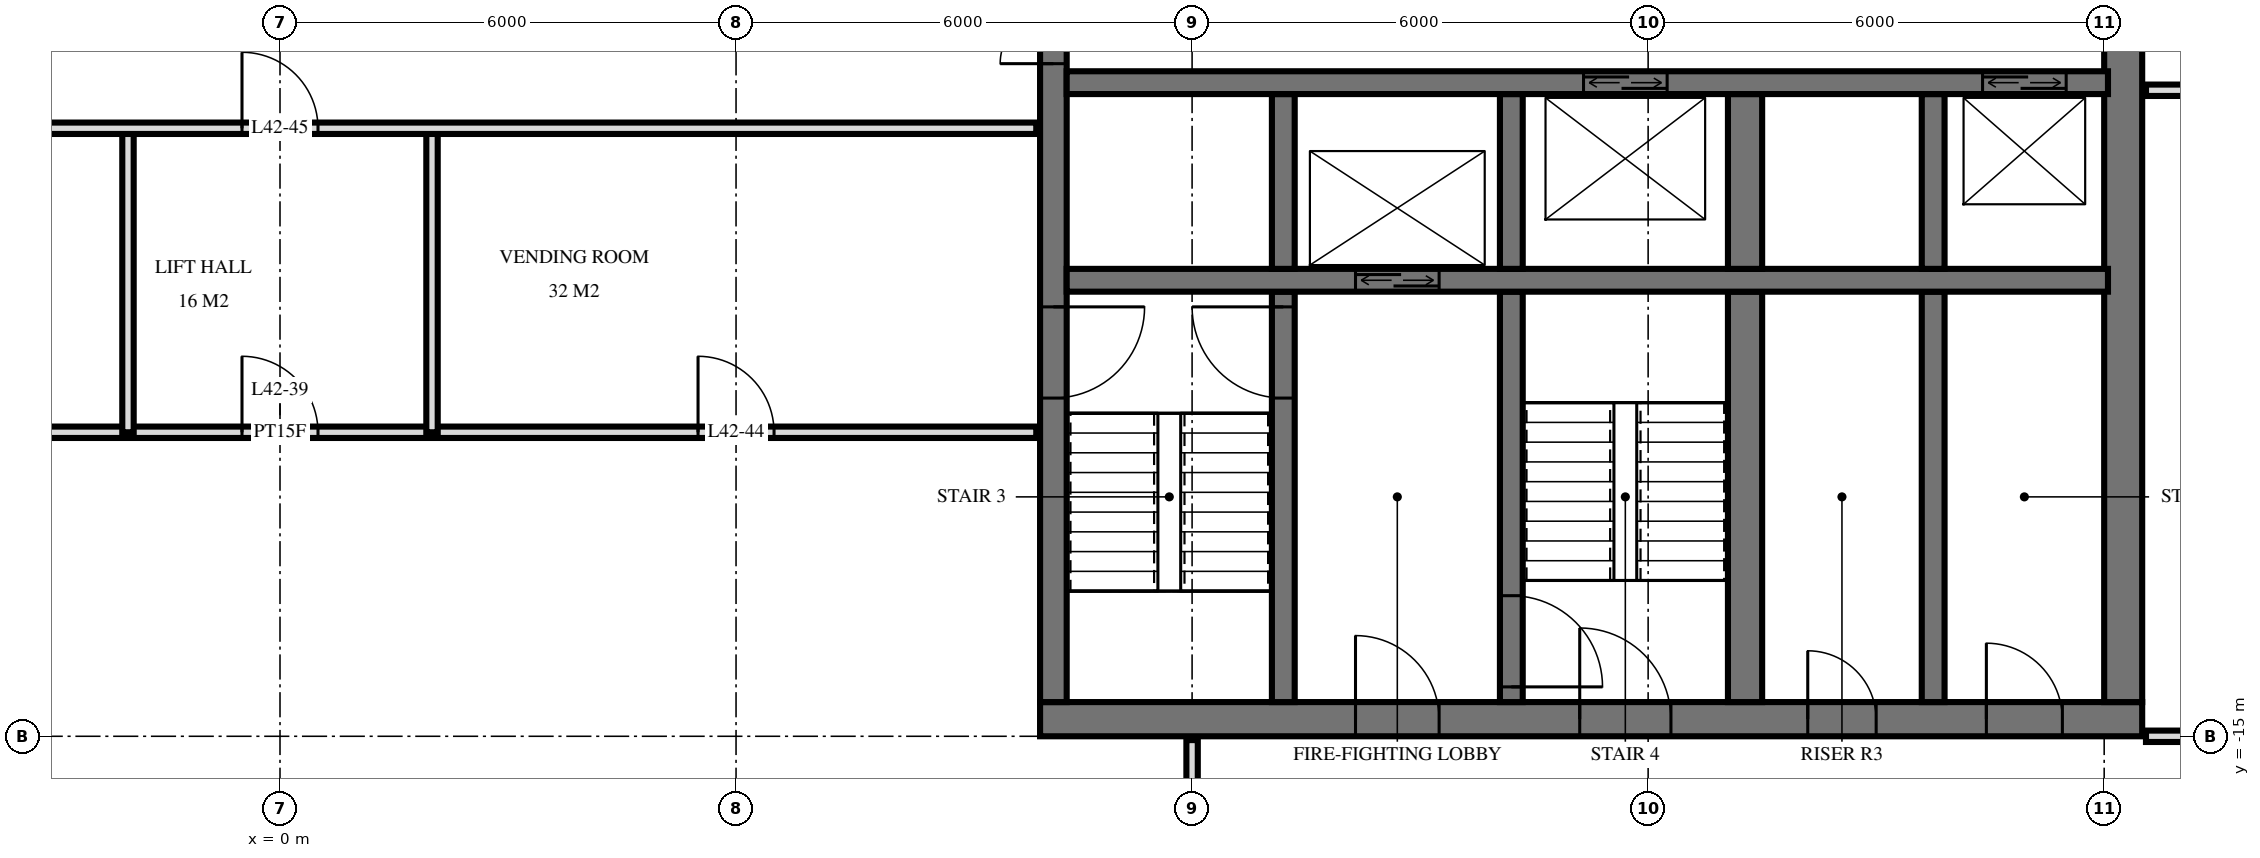
"""IFC4 building model, lengths in metres.
Left out: names, types, materials, properties, quantities, classifications, styles, units other than length and angle.
Written with IfcOpenShell. Run it as: python <this file> out.ifc"""

import sys

from ifc_helpers import new_model, si_unit, direction, frame, frame_2d, origin, place, context, subcontext, project, spatial, rectangle, extrude, element, fill, save


model = new_model("IFC4")
c1 = context("Model", 3, precision=1e-05, world=origin(), true_north=direction((0.0, 1.0)))
c2 = subcontext(c1, "Body", "Model", "MODEL_VIEW")
j1 = project(units=[si_unit("LENGTHUNIT", "METRE"), si_unit("PLANEANGLEUNIT", "RADIAN")], contexts=[c1])
p1 = place(None, origin())
s1 = spatial("IfcSite", under=j1, at=p1, CompositionType="ELEMENT")
p2 = place(p1, origin())
s2 = spatial("IfcBuilding", under=s1, at=p2, CompositionType="ELEMENT")
p3 = place(p2, frame((0.0, 0.0, 163.2)))
s3 = spatial("IfcBuildingStorey", under=s2, at=p3, CompositionType="ELEMENT", Elevation=163.2)
p4 = place(p3, frame((10.0, -14.775, 0.0), z_axis=(0.0, 0.0, 1.0), x_axis=(1.0, 0.0, 0.0)))
e1 = element("IfcWall", 1, at=p4, inside=s3, PredefinedType="SHEAR", context=c2, shape_type="SweptSolid", body=[
    extrude(rectangle(XDim=14.5, YDim=0.45, at=frame_2d((7.25, 0.0))), origin(), (0.0, 0.0, 1.0), 3.6),
])
p5 = place(p4, frame((7.1, 0.0, 0.0)))
e2 = element("IfcOpeningElement", 2, at=p5, cuts=e1, PredefinedType="OPENING", context=c2, shape_type="SweptSolid", body=[
    extrude(rectangle(XDim=1.2, YDim=2.1, at=frame_2d((0.6, 1.05))), frame((0.0, 0.235, 0.0), z_axis=(0.0, -1.0, 0.0), x_axis=(1.0, 0.0, 0.0)), (0.0, 0.0, 1.0), 0.47),
])
p6 = place(p4, frame((4.15, 0.0, 0.0)))
e3 = element("IfcOpeningElement", 3, at=p6, cuts=e1, PredefinedType="OPENING", context=c2, shape_type="SweptSolid", body=[
    extrude(rectangle(XDim=1.1, YDim=2.1, at=frame_2d((0.55, 1.05))), frame((0.0, 0.235, 0.0), z_axis=(0.0, -1.0, 0.0), x_axis=(1.0, 0.0, 0.0)), (0.0, 0.0, 1.0), 0.47),
])
p7 = place(p4, frame((10.1, 0.0, 0.0)))
e4 = element("IfcOpeningElement", 4, at=p7, cuts=e1, PredefinedType="OPENING", context=c2, shape_type="SweptSolid", body=[
    extrude(rectangle(XDim=0.9, YDim=2.1, at=frame_2d((0.45, 1.05))), frame((0.0, 0.235, 0.0), z_axis=(0.0, -1.0, 0.0), x_axis=(1.0, 0.0, 0.0)), (0.0, 0.0, 1.0), 0.47),
])
p8 = place(p4, frame((12.45, 0.0, 0.0)))
e5 = element("IfcOpeningElement", 5, at=p8, cuts=e1, PredefinedType="OPENING", context=c2, shape_type="SweptSolid", body=[
    extrude(rectangle(XDim=1.0, YDim=2.1, at=frame_2d((0.5, 1.05))), frame((0.0, 0.235, 0.0), z_axis=(0.0, -1.0, 0.0), x_axis=(1.0, 0.0, 0.0)), (0.0, 0.0, 1.0), 0.47),
])
p9 = place(p3, frame((10.175, -14.55, 0.0), z_axis=(0.0, 0.0, 1.0), x_axis=(0.0, 1.0, 0.0)))
e6 = element("IfcWall", 6, at=p9, inside=s3, PredefinedType="SHEAR", context=c2, shape_type="SweptSolid", body=[
    extrude(rectangle(XDim=14.1, YDim=0.35, at=frame_2d((7.05, 0.0))), origin(), (0.0, 0.0, 1.0), 3.6),
])
p10 = place(p9, frame((8.4, 0.0, 0.0)))
e7 = element("IfcOpeningElement", 7, at=p10, cuts=e6, PredefinedType="OPENING", context=c2, shape_type="SweptSolid", body=[
    extrude(rectangle(XDim=1.4, YDim=2.4, at=frame_2d((0.7, 1.2))), frame((0.0, 0.185, 0.0), z_axis=(0.0, -1.0, 0.0), x_axis=(1.0, 0.0, 0.0)), (0.0, 0.0, 1.0), 0.37),
])
p11 = place(p9, frame((10.0, 0.0, 0.0)))
e8 = element("IfcOpeningElement", 8, at=p11, cuts=e6, PredefinedType="OPENING", context=c2, shape_type="SweptSolid", body=[
    extrude(rectangle(XDim=1.4, YDim=2.4, at=frame_2d((0.7, 1.2))), frame((0.0, 0.185, 0.0), z_axis=(0.0, -1.0, 0.0), x_axis=(1.0, 0.0, 0.0)), (0.0, 0.0, 1.0), 0.37),
])
p12 = place(p9, frame((4.0, 0.0, 0.0)))
e9 = element("IfcOpeningElement", 9, at=p12, cuts=e6, PredefinedType="OPENING", context=c2, shape_type="SweptSolid", body=[
    extrude(rectangle(XDim=1.2, YDim=2.1, at=frame_2d((0.6, 1.05))), frame((0.0, 0.185, 0.0), z_axis=(0.0, -1.0, 0.0), x_axis=(1.0, 0.0, 0.0)), (0.0, 0.0, 1.0), 0.37),
])
p13 = place(p3, frame((24.25, -14.55, 0.0), z_axis=(0.0, 0.0, 1.0), x_axis=(0.0, 1.0, 0.0)))
e10 = element("IfcWall", 10, at=p13, inside=s3, PredefinedType="SHEAR", context=c2, shape_type="SweptSolid", body=[
    extrude(rectangle(XDim=14.1, YDim=0.5, at=frame_2d((7.05, 0.0))), origin(), (0.0, 0.0, 1.0), 3.6),
])
p14 = place(p3, frame((10.35, -6.4, 0.0), z_axis=(0.0, 0.0, 1.0), x_axis=(1.0, 0.0, 0.0)))
e11 = element("IfcWall", 11, at=p14, inside=s3, PredefinedType="SHEAR", context=c2, shape_type="SweptSolid", body=[
    extrude(rectangle(XDim=13.7, YDim=0.3, at=frame_2d((6.85, 0.0))), origin(), (0.0, 0.0, 1.0), 3.6),
])
p15 = place(p14, frame((12.05, 0.0, 0.0)))
e12 = element("IfcOpeningElement", 12, at=p15, cuts=e11, PredefinedType="OPENING", context=c2, shape_type="SweptSolid", body=[
    extrude(rectangle(XDim=1.1, YDim=2.1, at=frame_2d((0.55, 1.05))), frame((0.0, 0.16, 0.0), z_axis=(0.0, -1.0, 0.0), x_axis=(1.0, 0.0, 0.0)), (0.0, 0.0, 1.0), 0.32),
])
p16 = place(p14, frame((6.8, 0.0, 0.0)))
e13 = element("IfcOpeningElement", 13, at=p16, cuts=e11, PredefinedType="OPENING", context=c2, shape_type="SweptSolid", body=[
    extrude(rectangle(XDim=1.1, YDim=2.1, at=frame_2d((0.55, 1.05))), frame((0.0, 0.16, 0.0), z_axis=(0.0, -1.0, 0.0), x_axis=(1.0, 0.0, 0.0)), (0.0, 0.0, 1.0), 0.32),
])
p17 = place(p3, frame((10.35, -9.0, 0.0), z_axis=(0.0, 0.0, 1.0), x_axis=(1.0, 0.0, 0.0)))
e14 = element("IfcWall", 14, at=p17, inside=s3, PredefinedType="SHEAR", context=c2, shape_type="SweptSolid", body=[
    extrude(rectangle(XDim=13.7, YDim=0.3, at=frame_2d((6.85, 0.0))), origin(), (0.0, 0.0, 1.0), 3.6),
])
p18 = place(p17, frame((3.8, 0.0, 0.0)))
e15 = element("IfcOpeningElement", 15, at=p18, cuts=e14, PredefinedType="OPENING", context=c2, shape_type="SweptSolid", body=[
    extrude(rectangle(XDim=1.1, YDim=2.1, at=frame_2d((0.55, 1.05))), frame((0.0, 0.16, 0.0), z_axis=(0.0, -1.0, 0.0), x_axis=(1.0, 0.0, 0.0)), (0.0, 0.0, 1.0), 0.32),
])
p19 = place(p3, frame((13.2, -8.85, 0.0), z_axis=(0.0, 0.0, 1.0), x_axis=(0.0, 1.0, 0.0)))
e16 = element("IfcWall", 16, at=p19, inside=s3, PredefinedType="SHEAR", context=c2, shape_type="SweptSolid", body=[
    extrude(rectangle(XDim=2.3, YDim=0.3, at=frame_2d((1.15, 0.0))), origin(), (0.0, 0.0, 1.0), 3.6),
])
p20 = place(p3, frame((13.2, -14.55, 0.0), z_axis=(0.0, 0.0, 1.0), x_axis=(0.0, 1.0, 0.0)))
e17 = element("IfcWall", 17, at=p20, inside=s3, PredefinedType="SHEAR", context=c2, shape_type="SweptSolid", body=[
    extrude(rectangle(XDim=5.4, YDim=0.3, at=frame_2d((2.7, 0.0))), origin(), (0.0, 0.0, 1.0), 3.6),
])
p21 = place(p20, frame((4.0, 0.0, 0.0)))
e18 = element("IfcOpeningElement", 18, at=p21, cuts=e17, PredefinedType="OPENING", context=c2, shape_type="SweptSolid", body=[
    extrude(rectangle(XDim=1.2, YDim=2.1, at=frame_2d((0.6, 1.05))), frame((0.0, 0.16, 0.0), z_axis=(0.0, -1.0, 0.0), x_axis=(1.0, 0.0, 0.0)), (0.0, 0.0, 1.0), 0.32),
])
p22 = place(p3, frame((16.2, -8.85, 0.0), z_axis=(0.0, 0.0, 1.0), x_axis=(0.0, 1.0, 0.0)))
e19 = element("IfcWall", 19, at=p22, inside=s3, PredefinedType="SHEAR", context=c2, shape_type="SweptSolid", body=[
    extrude(rectangle(XDim=2.3, YDim=0.3, at=frame_2d((1.15, 0.0))), origin(), (0.0, 0.0, 1.0), 3.6),
])
p23 = place(p3, frame((16.2, -14.55, 0.0), z_axis=(0.0, 0.0, 1.0), x_axis=(0.0, 1.0, 0.0)))
e20 = element("IfcWall", 20, at=p23, inside=s3, PredefinedType="SHEAR", context=c2, shape_type="SweptSolid", body=[
    extrude(rectangle(XDim=5.4, YDim=0.3, at=frame_2d((2.7, 0.0))), origin(), (0.0, 0.0, 1.0), 3.6),
])
p24 = place(p23, frame((0.2, 0.0, 0.0)))
e21 = element("IfcOpeningElement", 21, at=p24, cuts=e20, PredefinedType="OPENING", context=c2, shape_type="SweptSolid", body=[
    extrude(rectangle(XDim=1.2, YDim=2.1, at=frame_2d((0.6, 1.05))), frame((0.0, 0.16, 0.0), z_axis=(0.0, -1.0, 0.0), x_axis=(1.0, 0.0, 0.0)), (0.0, 0.0, 1.0), 0.32),
])
p25 = place(p3, frame((19.275, -8.85, 0.0), z_axis=(0.0, 0.0, 1.0), x_axis=(0.0, 1.0, 0.0)))
e22 = element("IfcWall", 22, at=p25, inside=s3, PredefinedType="SHEAR", context=c2, shape_type="SweptSolid", body=[
    extrude(rectangle(XDim=2.3, YDim=0.45, at=frame_2d((1.15, 0.0))), origin(), (0.0, 0.0, 1.0), 3.6),
])
p26 = place(p3, frame((19.275, -14.55, 0.0), z_axis=(0.0, 0.0, 1.0), x_axis=(0.0, 1.0, 0.0)))
e23 = element("IfcWall", 23, at=p26, inside=s3, PredefinedType="SHEAR", context=c2, shape_type="SweptSolid", body=[
    extrude(rectangle(XDim=5.4, YDim=0.45, at=frame_2d((2.7, 0.0))), origin(), (0.0, 0.0, 1.0), 3.6),
])
p27 = place(p3, frame((21.75, -8.85, 0.0), z_axis=(0.0, 0.0, 1.0), x_axis=(0.0, 1.0, 0.0)))
e24 = element("IfcWall", 24, at=p27, inside=s3, PredefinedType="SHEAR", context=c2, shape_type="SweptSolid", body=[
    extrude(rectangle(XDim=2.3, YDim=0.3, at=frame_2d((1.15, 0.0))), origin(), (0.0, 0.0, 1.0), 3.6),
])
p28 = place(p3, frame((21.75, -14.55, 0.0), z_axis=(0.0, 0.0, 1.0), x_axis=(0.0, 1.0, 0.0)))
e25 = element("IfcWall", 25, at=p28, inside=s3, PredefinedType="SHEAR", context=c2, shape_type="SweptSolid", body=[
    extrude(rectangle(XDim=5.4, YDim=0.3, at=frame_2d((2.7, 0.0))), origin(), (0.0, 0.0, 1.0), 3.6),
])
p29 = place(p3, frame((12.0, -18.0, 0.0), z_axis=(0.0, 0.0, 1.0), x_axis=(0.0, 1.0, 0.0)))
e26 = element("IfcWall", 26, at=p29, inside=s3, PredefinedType="PARTITIONING", context=c2, shape_type="SweptSolid", body=[
    extrude(rectangle(XDim=2.95, YDim=0.15, at=frame_2d((1.475, 0.0))), origin(), (0.0, 0.0, 1.0), 3.32),
])
p30 = place(p29, frame((1.0, 0.0, 0.0)))
e27 = element("IfcOpeningElement", 27, at=p30, cuts=e26, PredefinedType="OPENING", context=c2, shape_type="SweptSolid", body=[
    extrude(rectangle(XDim=1.0, YDim=2.1, at=frame_2d((0.5, 1.05))), frame((0.0, 0.085, 0.0), z_axis=(0.0, -1.0, 0.0), x_axis=(1.0, 0.0, 0.0)), (0.0, 0.0, 1.0), 0.17),
])
for number, where, z_axis, x_axis in (
    (28, (2.0, -11.0, 0.0), (0.0, 0.0, 1.0), (0.0, 1.0, 0.0)),
    (29, (-2.0, -11.0, 0.0), (0.0, 0.0, 1.0), (0.0, 1.0, 0.0)),
):
    element("IfcWall", number, at=place(p3, frame(where, z_axis=z_axis, x_axis=x_axis)), inside=s3, PredefinedType="PARTITIONING", context=c2, shape_type="SweptSolid", body=[
        extrude(rectangle(XDim=4.0, YDim=0.15, at=frame_2d((2.0, 0.0))), origin(), (0.0, 0.0, 1.0), 3.32),
    ])
p31 = place(p3, frame((24.55, -15.0, 0.0), z_axis=(0.0, 0.0, 1.0), x_axis=(1.0, 0.0, 0.0)))
e30 = element("IfcWall", 30, at=p31, inside=s3, PredefinedType="PARTITIONING", context=c2, shape_type="SweptSolid", body=[
    extrude(rectangle(XDim=3.47, YDim=0.15, at=frame_2d((1.735, 0.0))), origin(), (0.0, 0.0, 1.0), 3.32),
])
p32 = place(p31, frame((0.9, 0.0, 0.0)))
e31 = element("IfcOpeningElement", 31, at=p32, cuts=e30, PredefinedType="OPENING", context=c2, shape_type="SweptSolid", body=[
    extrude(rectangle(XDim=1.0, YDim=2.1, at=frame_2d((0.5, 1.05))), frame((0.0, 0.085, 0.0), z_axis=(0.0, -1.0, 0.0), x_axis=(1.0, 0.0, 0.0)), (0.0, 0.0, 1.0), 0.17),
])
p33 = place(p3, frame((-9.95, -11.0, 0.0), z_axis=(0.0, 0.0, 1.0), x_axis=(1.0, 0.0, 0.0)))
e32 = element("IfcWall", 32, at=p33, inside=s3, PredefinedType="PARTITIONING", context=c2, shape_type="SweptSolid", body=[
    extrude(rectangle(XDim=19.9, YDim=0.15, at=frame_2d((9.95, 0.0))), origin(), (0.0, 0.0, 1.0), 3.32),
])
p34 = place(p33, frame((9.45, 0.0, 0.0)))
e33 = element("IfcOpeningElement", 33, at=p34, cuts=e32, PredefinedType="OPENING", context=c2, shape_type="SweptSolid", body=[
    extrude(rectangle(XDim=1.0, YDim=2.1, at=frame_2d((0.5, 1.05))), frame((0.0, 0.085, 0.0), z_axis=(0.0, -1.0, 0.0), x_axis=(1.0, 0.0, 0.0)), (0.0, 0.0, 1.0), 0.17),
])
p35 = place(p33, frame((15.45, 0.0, 0.0)))
e34 = element("IfcOpeningElement", 34, at=p35, cuts=e32, PredefinedType="OPENING", context=c2, shape_type="SweptSolid", body=[
    extrude(rectangle(XDim=1.0, YDim=2.1, at=frame_2d((0.5, 1.05))), frame((0.0, 0.085, 0.0), z_axis=(0.0, -1.0, 0.0), x_axis=(1.0, 0.0, 0.0)), (0.0, 0.0, 1.0), 0.17),
])
p36 = place(p3, frame((-9.95, -7.0, 0.0), z_axis=(0.0, 0.0, 1.0), x_axis=(1.0, 0.0, 0.0)))
e35 = element("IfcWall", 35, at=p36, inside=s3, PredefinedType="PARTITIONING", context=c2, shape_type="SweptSolid", body=[
    extrude(rectangle(XDim=19.9, YDim=0.15, at=frame_2d((9.95, 0.0))), origin(), (0.0, 0.0, 1.0), 3.32),
])
p37 = place(p36, frame((9.45, 0.0, 0.0)))
e36 = element("IfcOpeningElement", 36, at=p37, cuts=e35, PredefinedType="OPENING", context=c2, shape_type="SweptSolid", body=[
    extrude(rectangle(XDim=1.0, YDim=2.1, at=frame_2d((0.5, 1.05))), frame((0.0, 0.085, 0.0), z_axis=(0.0, -1.0, 0.0), x_axis=(1.0, 0.0, 0.0)), (0.0, 0.0, 1.0), 0.17),
])
p38 = place(p36, frame((3.45, 0.0, 0.0)))
e37 = element("IfcOpeningElement", 37, at=p38, cuts=e35, PredefinedType="OPENING", context=c2, shape_type="SweptSolid", body=[
    extrude(rectangle(XDim=1.0, YDim=2.1, at=frame_2d((0.5, 1.05))), frame((0.0, 0.085, 0.0), z_axis=(0.0, -1.0, 0.0), x_axis=(1.0, 0.0, 0.0)), (0.0, 0.0, 1.0), 0.17),
])
p39 = place(p3, frame((24.55, -6.5, 0.0), z_axis=(0.0, 0.0, 1.0), x_axis=(1.0, 0.0, 0.0)))
e38 = element("IfcWall", 38, at=p39, inside=s3, PredefinedType="PARTITIONING", context=c2, shape_type="SweptSolid", body=[
    extrude(rectangle(XDim=3.47, YDim=0.15, at=frame_2d((1.735, 0.0))), origin(), (0.0, 0.0, 1.0), 3.32),
])
p40 = place(p39, frame((1.35, 0.0, 0.0)))
e39 = element("IfcOpeningElement", 39, at=p40, cuts=e38, PredefinedType="OPENING", context=c2, shape_type="SweptSolid", body=[
    extrude(rectangle(XDim=0.9, YDim=2.1, at=frame_2d((0.45, 1.05))), frame((0.0, 0.085, 0.0), z_axis=(0.0, -1.0, 0.0), x_axis=(1.0, 0.0, 0.0)), (0.0, 0.0, 1.0), 0.17),
])
p41 = place(p15, origin())
e40 = element("IfcDoor", 40, at=p41, inside=s3, OperationType="DOUBLE_DOOR_SLIDING", PredefinedType="USERDEFINED", context=c2, shape_type="SweptSolid", body=[
    extrude(rectangle(XDim=1.1, YDim=2.1, at=frame_2d((0.55, 1.05))), frame((0.0, 0.025, 0.0), z_axis=(0.0, -1.0, 0.0), x_axis=(1.0, 0.0, 0.0)), (0.0, 0.0, 1.0), 0.05),
])
fill(e12, e40)
p42 = place(p18, origin())
e41 = element("IfcDoor", 41, at=p42, inside=s3, OperationType="DOUBLE_DOOR_SLIDING", PredefinedType="USERDEFINED", context=c2, shape_type="SweptSolid", body=[
    extrude(rectangle(XDim=1.1, YDim=2.1, at=frame_2d((0.55, 1.05))), frame((0.0, 0.025, 0.0), z_axis=(0.0, -1.0, 0.0), x_axis=(1.0, 0.0, 0.0)), (0.0, 0.0, 1.0), 0.05),
])
fill(e15, e41)
p43 = place(p16, origin())
e42 = element("IfcDoor", 42, at=p43, inside=s3, OperationType="DOUBLE_DOOR_SLIDING", PredefinedType="USERDEFINED", context=c2, shape_type="SweptSolid", body=[
    extrude(rectangle(XDim=1.1, YDim=2.1, at=frame_2d((0.55, 1.05))), frame((0.0, 0.025, 0.0), z_axis=(0.0, -1.0, 0.0), x_axis=(1.0, 0.0, 0.0)), (0.0, 0.0, 1.0), 0.05),
])
fill(e13, e42)
p44 = place(p10, origin())
e43 = element("IfcDoor", 43, at=p44, inside=s3, OperationType="DOUBLE_DOOR_SINGLE_SWING", PredefinedType="DOOR", context=c2, shape_type="SweptSolid", body=[
    extrude(rectangle(XDim=1.4, YDim=2.4, at=frame_2d((0.7, 1.2))), frame((0.0, 0.025, 0.0), z_axis=(0.0, -1.0, 0.0), x_axis=(1.0, 0.0, 0.0)), (0.0, 0.0, 1.0), 0.05),
])
fill(e7, e43)
p45 = place(p12, frame((0.6, 0.0, 0.0), z_axis=(0.0, 0.0, 1.0), x_axis=(-1.0, 0.0, 0.0)))
e44 = element("IfcDoor", 44, at=p45, inside=s3, OperationType="SINGLE_SWING_RIGHT", PredefinedType="DOOR", context=c2, shape_type="SweptSolid", body=[
    extrude(rectangle(XDim=1.2, YDim=2.1, at=frame_2d((0.0, 1.05))), frame((0.0, -0.025, 0.0), z_axis=(0.0, 1.0, 0.0), x_axis=(-1.0, 0.0, 0.0)), (0.0, 0.0, 1.0), 0.05),
])
fill(e9, e44)
p46 = place(p5, origin())
e45 = element("IfcDoor", 45, at=p46, inside=s3, OperationType="SINGLE_SWING_RIGHT", PredefinedType="DOOR", context=c2, shape_type="SweptSolid", body=[
    extrude(rectangle(XDim=1.2, YDim=2.1, at=frame_2d((0.6, 1.05))), frame((0.0, 0.025, 0.0), z_axis=(0.0, -1.0, 0.0), x_axis=(1.0, 0.0, 0.0)), (0.0, 0.0, 1.0), 0.05),
])
fill(e2, e45)
p47 = place(p6, origin())
e46 = element("IfcDoor", 46, at=p47, inside=s3, OperationType="SINGLE_SWING_RIGHT", PredefinedType="DOOR", context=c2, shape_type="SweptSolid", body=[
    extrude(rectangle(XDim=1.1, YDim=2.1, at=frame_2d((0.55, 1.05))), frame((0.0, 0.025, 0.0), z_axis=(0.0, -1.0, 0.0), x_axis=(1.0, 0.0, 0.0)), (0.0, 0.0, 1.0), 0.05),
])
fill(e3, e46)
p48 = place(p7, origin())
e47 = element("IfcDoor", 47, at=p48, inside=s3, OperationType="SINGLE_SWING_RIGHT", PredefinedType="DOOR", context=c2, shape_type="SweptSolid", body=[
    extrude(rectangle(XDim=0.9, YDim=2.1, at=frame_2d((0.45, 1.05))), frame((0.0, 0.025, 0.0), z_axis=(0.0, -1.0, 0.0), x_axis=(1.0, 0.0, 0.0)), (0.0, 0.0, 1.0), 0.05),
])
fill(e4, e47)
p49 = place(p8, origin())
e48 = element("IfcDoor", 48, at=p49, inside=s3, OperationType="SINGLE_SWING_RIGHT", PredefinedType="DOOR", context=c2, shape_type="SweptSolid", body=[
    extrude(rectangle(XDim=1.0, YDim=2.1, at=frame_2d((0.5, 1.05))), frame((0.0, 0.025, 0.0), z_axis=(0.0, -1.0, 0.0), x_axis=(1.0, 0.0, 0.0)), (0.0, 0.0, 1.0), 0.05),
])
fill(e5, e48)
p50 = place(p21, origin())
e49 = element("IfcDoor", 49, at=p50, inside=s3, OperationType="SINGLE_SWING_LEFT", PredefinedType="DOOR", context=c2, shape_type="SweptSolid", body=[
    extrude(rectangle(XDim=1.2, YDim=2.1, at=frame_2d((0.6, 1.05))), frame((0.0, 0.025, 0.0), z_axis=(0.0, -1.0, 0.0), x_axis=(1.0, 0.0, 0.0)), (0.0, 0.0, 1.0), 0.05),
])
fill(e18, e49)
p51 = place(p24, frame((0.6, 0.0, 0.0), z_axis=(0.0, 0.0, 1.0), x_axis=(-1.0, 0.0, 0.0)))
e50 = element("IfcDoor", 50, at=p51, inside=s3, OperationType="SINGLE_SWING_LEFT", PredefinedType="DOOR", context=c2, shape_type="SweptSolid", body=[
    extrude(rectangle(XDim=1.2, YDim=2.1, at=frame_2d((0.0, 1.05))), frame((0.0, -0.025, 0.0), z_axis=(0.0, 1.0, 0.0), x_axis=(-1.0, 0.0, 0.0)), (0.0, 0.0, 1.0), 0.05),
])
fill(e21, e50)
p52 = place(p34, origin())
e51 = element("IfcDoor", 51, at=p52, inside=s3, OperationType="SINGLE_SWING_RIGHT", PredefinedType="DOOR", context=c2, shape_type="SweptSolid", body=[
    extrude(rectangle(XDim=1.0, YDim=2.1, at=frame_2d((0.5, 1.05))), frame((0.0, 0.025, 0.0), z_axis=(0.0, -1.0, 0.0), x_axis=(1.0, 0.0, 0.0)), (0.0, 0.0, 1.0), 0.05),
])
fill(e33, e51)
p53 = place(p35, origin())
e52 = element("IfcDoor", 52, at=p53, inside=s3, OperationType="SINGLE_SWING_RIGHT", PredefinedType="DOOR", context=c2, shape_type="SweptSolid", body=[
    extrude(rectangle(XDim=1.0, YDim=2.1, at=frame_2d((0.5, 1.05))), frame((0.0, 0.025, 0.0), z_axis=(0.0, -1.0, 0.0), x_axis=(1.0, 0.0, 0.0)), (0.0, 0.0, 1.0), 0.05),
])
fill(e34, e52)
p54 = place(p37, origin())
e53 = element("IfcDoor", 53, at=p54, inside=s3, OperationType="SINGLE_SWING_RIGHT", PredefinedType="DOOR", context=c2, shape_type="SweptSolid", body=[
    extrude(rectangle(XDim=1.0, YDim=2.1, at=frame_2d((0.5, 1.05))), frame((0.0, 0.025, 0.0), z_axis=(0.0, -1.0, 0.0), x_axis=(1.0, 0.0, 0.0)), (0.0, 0.0, 1.0), 0.05),
])
fill(e36, e53)
save(model, sys.argv[1])
